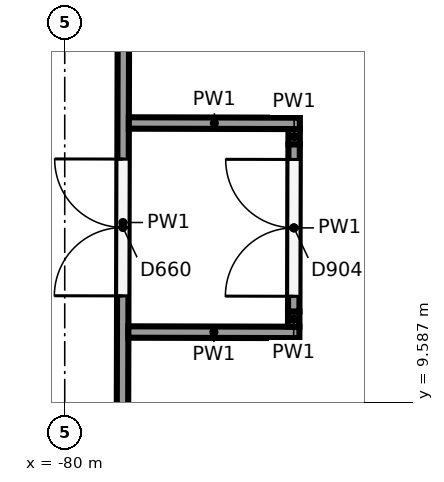
"""IFC4 building model, lengths in metres.
Left out: names, types, materials, properties, quantities, classifications, styles, units other than length and angle.
Written with IfcOpenShell. Run it as: python <this file> out.ifc"""

import sys

from ifc_helpers import new_model, si_unit, direction, frame, frame_2d, origin, place, context, subcontext, project, spatial, rectangle, extrude, element, fill, save


model = new_model("IFC4")
c1 = context("Model", 3, precision=1e-05, world=origin(), true_north=direction((0.0, 1.0)))
c2 = subcontext(c1, "Body", "Model", "MODEL_VIEW")
j1 = project(units=[si_unit("LENGTHUNIT", "METRE"), si_unit("PLANEANGLEUNIT", "RADIAN")], contexts=[c1])
p1 = place(None, origin())
s1 = spatial("IfcSite", under=j1, at=p1, CompositionType="ELEMENT")
p2 = place(p1, origin())
s2 = spatial("IfcBuilding", under=s1, at=p2, CompositionType="ELEMENT")
p3 = place(p2, frame((0.0, 0.0, 6.5)))
s3 = spatial("IfcBuildingStorey", under=s2, at=p3, CompositionType="ELEMENT", Elevation=6.5)
p4 = place(p3, frame((-79.247, 6.537, 0.0), z_axis=(0.0, 0.0, 1.0), x_axis=(0.002276512155, 0.999997408743, 0.0)))
e1 = element("IfcWall", 1, at=p4, inside=s3, PredefinedType="PARTITIONING", context=c2, shape_type="SweptSolid", body=[
    extrude(rectangle(XDim=10.832, YDim=0.15, at=frame_2d((5.416, 0.0))), origin(), (0.0, 0.0, 1.0), 5.15),
])
p5 = place(p4, frame((4.45, 0.0, 0.0)))
e2 = element("IfcOpeningElement", 2, at=p5, cuts=e1, PredefinedType="OPENING", context=c2, shape_type="SweptSolid", body=[
    extrude(rectangle(XDim=1.8, YDim=2.1, at=frame_2d((0.9, 1.05))), frame((0.0, 0.085, 0.0), z_axis=(0.0, -1.0, 0.0), x_axis=(1.0, 0.0, 0.0)), (0.0, 0.0, 1.0), 0.17),
])
for number, where, z_axis, x_axis in (
    (3, (-79.163, 10.511, 0.0), (0.0, 0.0, 1.0), (1.0, -0.002, 0.0)),
    (4, (-79.156, 13.261, 0.0), (0.0, 0.0, 1.0), (1.0, -0.002, 0.0)),
):
    element("IfcWall", number, at=place(p3, frame(where, z_axis=z_axis, x_axis=x_axis)), inside=s3, PredefinedType="PARTITIONING", context=c2, shape_type="SweptSolid", body=[
        extrude(rectangle(XDim=2.25, YDim=0.15, at=frame_2d((1.125, 0.0))), origin(), (0.0, 0.0, 1.0), 5.15),
    ])
p6 = place(p3, frame((-76.988, 10.582, 0.0), z_axis=(0.0, 0.0, 1.0), x_axis=(0.002441995161, 0.999997018325, 0.0)))
e5 = element("IfcWall", 5, at=p6, inside=s3, PredefinedType="PARTITIONING", context=c2, shape_type="SweptSolid", body=[
    extrude(rectangle(XDim=0.2, YDim=0.15, at=frame_2d((0.1, 0.0))), origin(), (0.0, 0.0, 1.0), 5.15),
])
p7 = place(p3, frame((-76.987, 10.781, 0.0), z_axis=(0.0, 0.0, 1.0), x_axis=(0.002330220038, 0.999997285034, 0.0)))
e6 = element("IfcWall", 6, at=p7, inside=s3, PredefinedType="PARTITIONING", context=c2, shape_type="SweptSolid", body=[
    extrude(rectangle(XDim=2.2, YDim=0.15, at=frame_2d((1.1, 0.0))), origin(), (0.0, 0.0, 1.0), 5.15),
])
p8 = place(p7, frame((0.2, 0.0, 0.0)))
e7 = element("IfcOpeningElement", 7, at=p8, cuts=e6, PredefinedType="OPENING", context=c2, shape_type="SweptSolid", body=[
    extrude(rectangle(XDim=1.8, YDim=2.1, at=frame_2d((0.9, 1.05))), frame((0.0, 0.085, 0.0), z_axis=(0.0, -1.0, 0.0), x_axis=(1.0, 0.0, 0.0)), (0.0, 0.0, 1.0), 0.17),
])
p9 = place(p3, frame((-76.982, 12.982, 0.0), z_axis=(0.0, 0.0, 1.0), x_axis=(0.002441995161, 0.999997018325, 0.0)))
e8 = element("IfcWall", 8, at=p9, inside=s3, PredefinedType="PARTITIONING", context=c2, shape_type="SweptSolid", body=[
    extrude(rectangle(XDim=0.2, YDim=0.15, at=frame_2d((0.1, 0.0))), origin(), (0.0, 0.0, 1.0), 5.15),
])
p10 = place(p5, origin())
e9 = element("IfcDoor", 9, at=p10, inside=s3, OperationType="DOUBLE_DOOR_SINGLE_SWING", PredefinedType="DOOR", context=c2, shape_type="SweptSolid", body=[
    extrude(rectangle(XDim=1.8, YDim=2.1, at=frame_2d((0.9, 1.05))), frame((0.0, 0.025, 0.0), z_axis=(0.0, -1.0, 0.0), x_axis=(1.0, 0.0, 0.0)), (0.0, 0.0, 1.0), 0.05),
])
fill(e2, e9)
p11 = place(p8, origin())
e10 = element("IfcDoor", 10, at=p11, inside=s3, OperationType="DOUBLE_DOOR_SINGLE_SWING", PredefinedType="DOOR", context=c2, shape_type="SweptSolid", body=[
    extrude(rectangle(XDim=1.8, YDim=2.1, at=frame_2d((0.9, 1.05))), frame((0.0, 0.025, 0.0), z_axis=(0.0, -1.0, 0.0), x_axis=(1.0, 0.0, 0.0)), (0.0, 0.0, 1.0), 0.05),
])
fill(e7, e10)
save(model, sys.argv[1])
